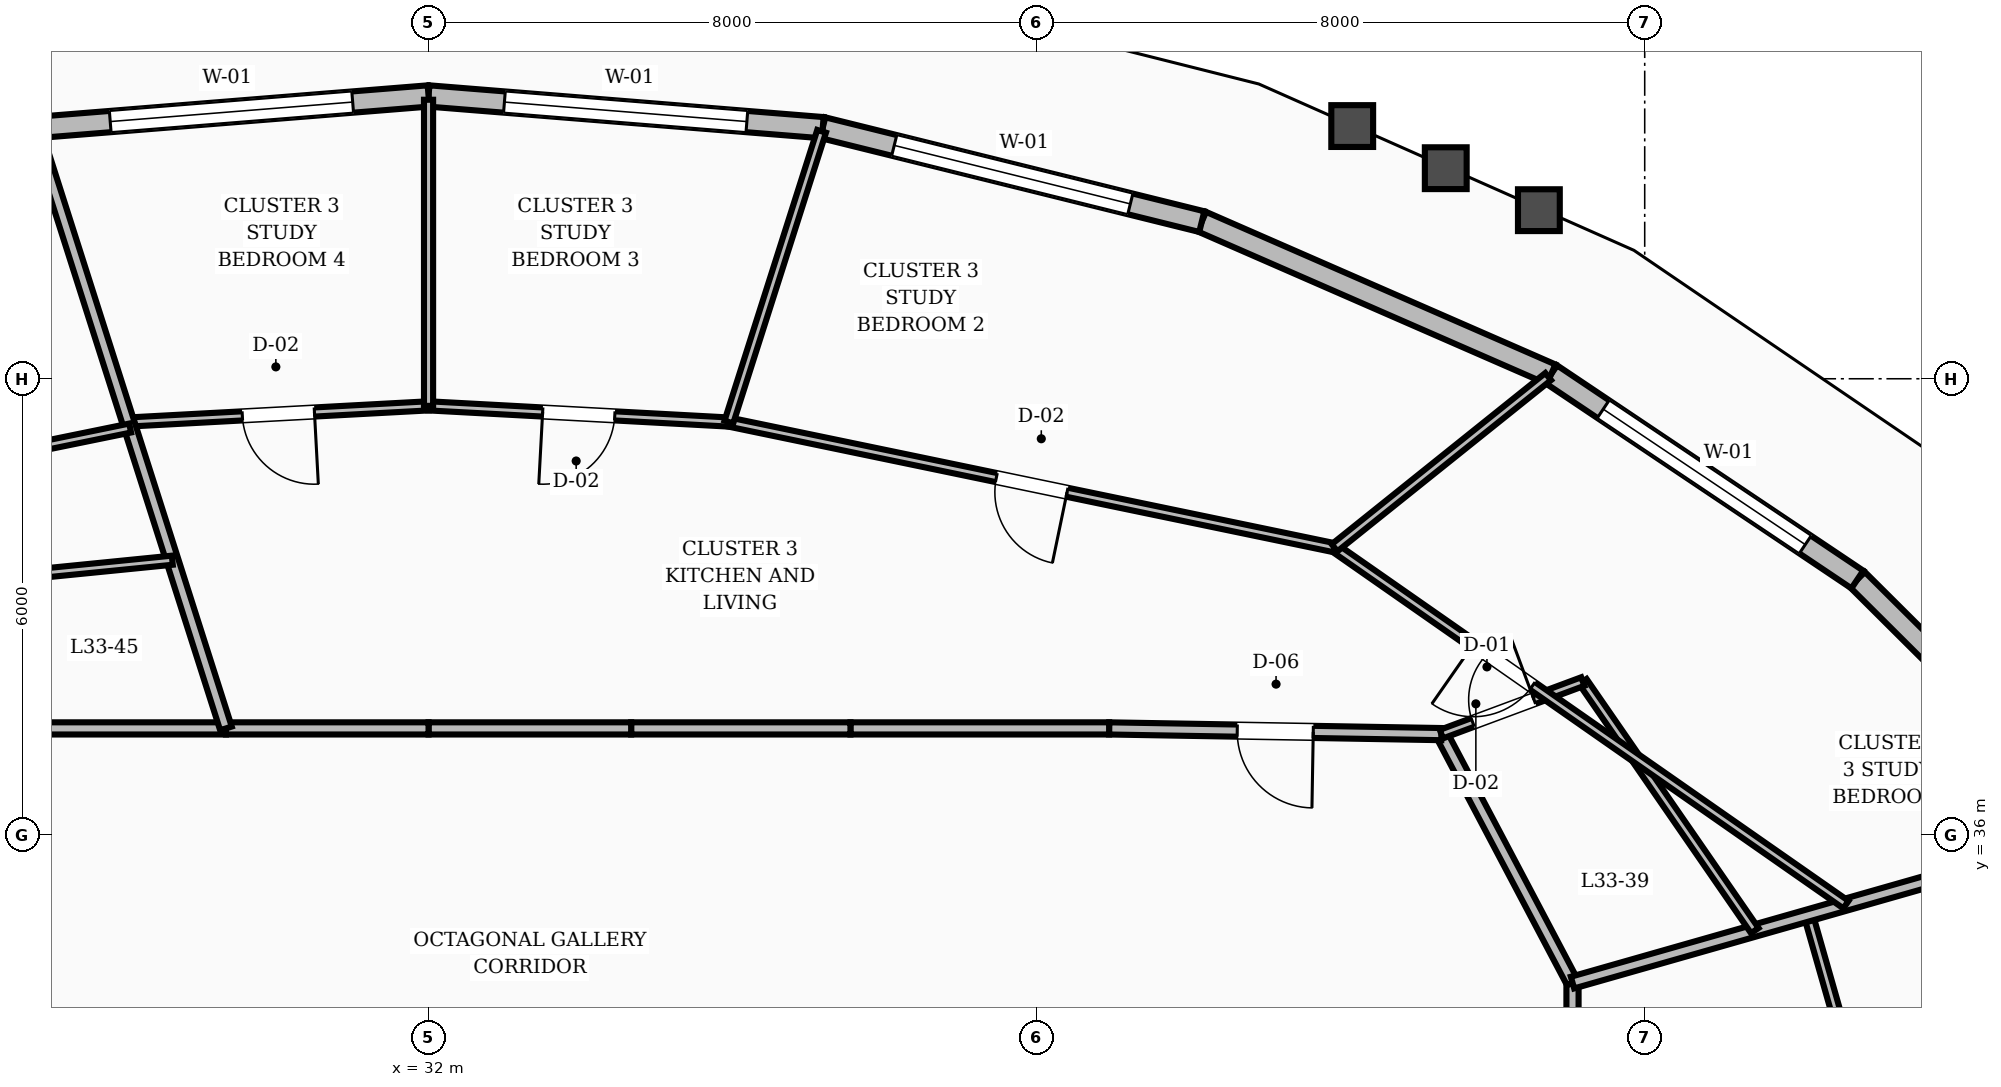
"""IFC4 building model, lengths in metres.
Left out: names, types, materials, properties, quantities, classifications, styles, units other than length and angle.
Written with IfcOpenShell. Run it as: python <this file> out.ifc"""

import sys

from ifc_helpers import new_model, si_unit, direction, frame, frame_2d, origin, place, context, subcontext, project, spatial, rectangle, extrude, element, fill, save


model = new_model("IFC4")
c1 = context("Model", 3, precision=1e-05, world=origin(), true_north=direction((0.0, 1.0)))
c2 = subcontext(c1, "Body", "Model", "MODEL_VIEW")
j1 = project(units=[si_unit("LENGTHUNIT", "METRE"), si_unit("PLANEANGLEUNIT", "RADIAN")], contexts=[c1])
p1 = place(None, origin())
s1 = spatial("IfcSite", under=j1, at=p1, CompositionType="ELEMENT")
p2 = place(p1, origin())
s2 = spatial("IfcBuilding", under=s1, at=p2, CompositionType="ELEMENT")
p3 = place(p2, frame((0.0, 0.0, 131.6)))
s3 = spatial("IfcBuildingStorey", under=s2, at=p3, CompositionType="ELEMENT", Elevation=131.6)
p4 = place(p3, frame((54.104, 36.067, 0.0), z_axis=(0.0, 0.0, 1.0), x_axis=(-0.708648936292, 0.705561255379, 0.0)))
e1 = element("IfcWall", 1, at=p4, inside=s3, PredefinedType="STANDARD", context=c2, shape_type="SweptSolid", body=[
    extrude(rectangle(XDim=4.665, YDim=0.28, at=frame_2d((2.333, 0.0))), origin(), (0.0, 0.0, 1.0), 2.82),
])
p5 = place(p3, frame((50.798, 39.359, 0.0), z_axis=(0.0, 0.0, 1.0), x_axis=(-0.830576039751, 0.556905236277, 0.0)))
e2 = element("IfcWall", 2, at=p5, inside=s3, PredefinedType="STANDARD", context=c2, shape_type="SweptSolid", body=[
    extrude(rectangle(XDim=4.85, YDim=0.28, at=frame_2d((2.425, 0.0))), origin(), (0.0, 0.0, 1.0), 2.82),
])
p6 = place(p5, frame((0.825, 0.0, 0.8)))
e3 = element("IfcOpeningElement", 3, at=p6, cuts=e2, PredefinedType="OPENING", context=c2, shape_type="SweptSolid", body=[
    extrude(rectangle(XDim=3.2, YDim=1.65, at=frame_2d((1.6, 0.825))), frame((0.0, 0.15, 0.0), z_axis=(0.0, -1.0, 0.0), x_axis=(1.0, 0.0, 0.0)), (0.0, 0.0, 1.0), 0.3),
])
p7 = place(p3, frame((46.769, 42.06, 0.0), z_axis=(0.0, 0.0, 1.0), x_axis=(-0.916424160111, 0.400208394171, 0.0)))
e4 = element("IfcWall", 4, at=p7, inside=s3, PredefinedType="STANDARD", context=c2, shape_type="SweptSolid", body=[
    extrude(rectangle(XDim=5.015, YDim=0.28, at=frame_2d((2.508, 0.0))), origin(), (0.0, 0.0, 1.0), 2.82),
])
p8 = place(p3, frame((42.173, 44.067, 0.0), z_axis=(0.0, 0.0, 1.0), x_axis=(-0.970626922291, 0.24058964592, 0.0)))
e5 = element("IfcWall", 5, at=p8, inside=s3, PredefinedType="STANDARD", context=c2, shape_type="SweptSolid", body=[
    extrude(rectangle(XDim=5.138, YDim=0.28, at=frame_2d((2.569, 0.0))), origin(), (0.0, 0.0, 1.0), 2.82),
])
p9 = place(p8, frame((0.969, 0.0, 0.8)))
e6 = element("IfcOpeningElement", 6, at=p9, cuts=e5, PredefinedType="OPENING", context=c2, shape_type="SweptSolid", body=[
    extrude(rectangle(XDim=3.2, YDim=1.65, at=frame_2d((1.6, 0.825))), frame((0.0, 0.15, 0.0), z_axis=(0.0, -1.0, 0.0), x_axis=(1.0, 0.0, 0.0)), (0.0, 0.0, 1.0), 0.3),
])
p10 = place(p3, frame((37.186, 45.303, 0.0), z_axis=(0.0, 0.0, 1.0), x_axis=(-0.996775768856, 0.080237563656, 0.0)))
e7 = element("IfcWall", 7, at=p10, inside=s3, PredefinedType="STANDARD", context=c2, shape_type="SweptSolid", body=[
    extrude(rectangle(XDim=5.203, YDim=0.28, at=frame_2d((2.602, 0.0))), origin(), (0.0, 0.0, 1.0), 2.82),
])
p11 = place(p10, frame((1.001, 0.0, 0.8)))
e8 = element("IfcOpeningElement", 8, at=p11, cuts=e7, PredefinedType="OPENING", context=c2, shape_type="SweptSolid", body=[
    extrude(rectangle(XDim=3.2, YDim=1.65, at=frame_2d((1.6, 0.825))), frame((0.0, 0.15, 0.0), z_axis=(0.0, -1.0, 0.0), x_axis=(1.0, 0.0, 0.0)), (0.0, 0.0, 1.0), 0.3),
])
p12 = place(p3, frame((32.0, 45.721, 0.0), z_axis=(0.0, 0.0, 1.0), x_axis=(-0.996775768856, -0.080237563656, 0.0)))
e9 = element("IfcWall", 9, at=p12, inside=s3, PredefinedType="STANDARD", context=c2, shape_type="SweptSolid", body=[
    extrude(rectangle(XDim=5.203, YDim=0.28, at=frame_2d((2.602, 0.0))), origin(), (0.0, 0.0, 1.0), 2.82),
])
p13 = place(p12, frame((1.001, 0.0, 0.8)))
e10 = element("IfcOpeningElement", 10, at=p13, cuts=e9, PredefinedType="OPENING", context=c2, shape_type="SweptSolid", body=[
    extrude(rectangle(XDim=3.2, YDim=1.65, at=frame_2d((1.6, 0.825))), frame((0.0, 0.15, 0.0), z_axis=(0.0, -1.0, 0.0), x_axis=(1.0, 0.0, 0.0)), (0.0, 0.0, 1.0), 0.3),
])
p14 = place(p3, frame((47.05, 30.234, 0.0), z_axis=(0.0, 0.0, 1.0), x_axis=(0.0, 1.0, 0.0)))
e11 = element("IfcWall", 11, at=p14, inside=s3, PredefinedType="SOLIDWALL", context=c2, shape_type="SweptSolid", body=[
    extrude(rectangle(XDim=3.822, YDim=0.16, at=frame_2d((1.911, 0.0))), origin(), (0.0, 0.0, 1.0), 2.8),
])
p15 = place(p3, frame((47.05, 34.056, 0.0), z_axis=(0.0, 0.0, 1.0), x_axis=(-0.466737093093, 0.884396113702, 0.0)))
e12 = element("IfcWall", 12, at=p15, inside=s3, PredefinedType="SOLIDWALL", context=c2, shape_type="SweptSolid", body=[
    extrude(rectangle(XDim=3.696, YDim=0.16, at=frame_2d((1.848, 0.0))), origin(), (0.0, 0.0, 1.0), 2.8),
])
p16 = place(p3, frame((45.325, 37.325, 0.0), z_axis=(0.0, 0.0, 1.0), x_axis=(-0.999853038912, 0.017143528788, 0.0)))
e13 = element("IfcWall", 13, at=p16, inside=s3, PredefinedType="SOLIDWALL", context=c2, shape_type="SweptSolid", body=[
    extrude(rectangle(XDim=4.372, YDim=0.16, at=frame_2d((2.186, 0.0))), origin(), (0.0, 0.0, 1.0), 2.8),
])
p17 = place(p16, frame((1.686, 0.0, 0.0)))
e14 = element("IfcOpeningElement", 14, at=p17, cuts=e13, PredefinedType="OPENING", context=c2, shape_type="SweptSolid", body=[
    extrude(rectangle(XDim=1.0, YDim=2.1, at=frame_2d((0.5, 1.05))), frame((0.0, 0.09, 0.0), z_axis=(0.0, -1.0, 0.0), x_axis=(1.0, 0.0, 0.0)), (0.0, 0.0, 1.0), 0.18),
])
p18 = place(p3, frame((40.954, 37.4, 0.0), z_axis=(0.0, 0.0, 1.0), x_axis=(-1.0, 0.0, 0.0)))
e15 = element("IfcWall", 15, at=p18, inside=s3, PredefinedType="SOLIDWALL", context=c2, shape_type="SweptSolid", body=[
    extrude(rectangle(XDim=3.403, YDim=0.16, at=frame_2d((1.702, 0.0))), origin(), (0.0, 0.0, 1.0), 2.8),
])
p19 = place(p3, frame((37.551, 37.4, 0.0), z_axis=(0.0, 0.0, 1.0), x_axis=(-1.0, 0.0, 0.0)))
e16 = element("IfcWall", 16, at=p19, inside=s3, PredefinedType="SOLIDWALL", context=c2, shape_type="SweptSolid", body=[
    extrude(rectangle(XDim=2.885, YDim=0.16, at=frame_2d((1.443, 0.0))), origin(), (0.0, 0.0, 1.0), 2.8),
])
for number, where, z_axis, x_axis in (
    (17, (34.665, 37.4, 0.0), (0.0, 0.0, 1.0), (-1.0, 0.0, 0.0)),
    (18, (32.0, 37.4, 0.0), (0.0, 0.0, 1.0), (-1.0, 0.0, 0.0)),
):
    element("IfcWall", number, at=place(p3, frame(where, z_axis=z_axis, x_axis=x_axis)), inside=s3, PredefinedType="SOLIDWALL", context=c2, shape_type="SweptSolid", body=[
        extrude(rectangle(XDim=2.665, YDim=0.16, at=frame_2d((1.333, 0.0))), origin(), (0.0, 0.0, 1.0), 2.8),
    ])
p20 = place(p3, frame((29.335, 37.4, 0.0), z_axis=(0.0, 0.0, 1.0), x_axis=(-1.0, 0.0, 0.0)))
e19 = element("IfcWall", 19, at=p20, inside=s3, PredefinedType="SOLIDWALL", context=c2, shape_type="SweptSolid", body=[
    extrude(rectangle(XDim=2.885, YDim=0.16, at=frame_2d((1.443, 0.0))), origin(), (0.0, 0.0, 1.0), 2.8),
])
p21 = place(p3, frame((51.234, 31.148, 0.0), z_axis=(0.0, 0.0, 1.0), x_axis=(-0.274058783109, 0.961712942307, 0.0)))
e20 = element("IfcWall", 20, at=p21, inside=s3, PredefinedType="PARTITIONING", context=c2, shape_type="SweptSolid", body=[
    extrude(rectangle(XDim=3.944, YDim=0.12, at=frame_2d((1.972, 0.0))), origin(), (0.0, 0.0, 1.0), 2.8),
])
p22 = place(p21, frame((1.497, 0.0, 0.0)))
e21 = element("IfcOpeningElement", 21, at=p22, cuts=e20, PredefinedType="OPENING", context=c2, shape_type="SweptSolid", body=[
    extrude(rectangle(XDim=0.95, YDim=2.1, at=frame_2d((0.475, 1.05))), frame((0.0, 0.07, 0.0), z_axis=(0.0, -1.0, 0.0), x_axis=(1.0, 0.0, 0.0)), (0.0, 0.0, 1.0), 0.14),
])
p23 = place(p3, frame((47.05, 34.056, 0.0), z_axis=(0.0, 0.0, 1.0), x_axis=(0.961667991251, 0.274216473981, 0.0)))
e22 = element("IfcWall", 22, at=p23, inside=s3, PredefinedType="SOLIDWALL", context=c2, shape_type="SweptSolid", body=[
    extrude(rectangle(XDim=7.285, YDim=0.16, at=frame_2d((3.642, 0.0))), origin(), (0.0, 0.0, 1.0), 2.8),
])
p24 = place(p3, frame((49.448, 34.74, 0.0), z_axis=(0.0, 0.0, 1.0), x_axis=(-0.568195659841, 0.822893487723, 0.0)))
e23 = element("IfcWall", 23, at=p24, inside=s3, PredefinedType="PARTITIONING", context=c2, shape_type="SweptSolid", body=[
    extrude(rectangle(XDim=3.982, YDim=0.12, at=frame_2d((1.991, 0.0))), origin(), (0.0, 0.0, 1.0), 2.8),
])
p25 = place(p3, frame((45.325, 37.325, 0.0), z_axis=(0.0, 0.0, 1.0), x_axis=(0.937346114238, 0.348399572506, 0.0)))
e24 = element("IfcWall", 24, at=p25, inside=s3, PredefinedType="PARTITIONING", context=c2, shape_type="SweptSolid", body=[
    extrude(rectangle(XDim=1.985, YDim=0.12, at=frame_2d((0.993, 0.0))), origin(), (0.0, 0.0, 1.0), 2.8),
])
p26 = place(p25, frame((0.44, 0.0, 0.0)))
e25 = element("IfcOpeningElement", 25, at=p26, cuts=e24, PredefinedType="OPENING", context=c2, shape_type="SweptSolid", body=[
    extrude(rectangle(XDim=0.86, YDim=2.1, at=frame_2d((0.43, 1.05))), frame((0.0, 0.07, 0.0), z_axis=(0.0, -1.0, 0.0), x_axis=(1.0, 0.0, 0.0)), (0.0, 0.0, 1.0), 0.14),
])
p27 = place(p3, frame((50.647, 35.082, 0.0), z_axis=(0.0, 0.0, 1.0), x_axis=(-0.820068492929, 0.572265381537, 0.0)))
e26 = element("IfcWall", 26, at=p27, inside=s3, PredefinedType="PARTITIONING", context=c2, shape_type="SweptSolid", body=[
    extrude(rectangle(XDim=8.204, YDim=0.12, at=frame_2d((4.102, 0.0))), origin(), (0.0, 0.0, 1.0), 2.8),
])
p28 = place(p27, frame((5.029, 0.0, 0.0)))
e27 = element("IfcOpeningElement", 27, at=p28, cuts=e26, PredefinedType="OPENING", context=c2, shape_type="SweptSolid", body=[
    extrude(rectangle(XDim=0.95, YDim=2.1, at=frame_2d((0.475, 1.05))), frame((0.0, 0.07, 0.0), z_axis=(0.0, -1.0, 0.0), x_axis=(1.0, 0.0, 0.0)), (0.0, 0.0, 1.0), 0.14),
])
p29 = place(p3, frame((43.919, 39.777, 0.0), z_axis=(0.0, 0.0, 1.0), x_axis=(-0.97912865648, 0.20324141817, 0.0)))
e28 = element("IfcWall", 28, at=p29, inside=s3, PredefinedType="PARTITIONING", context=c2, shape_type="SweptSolid", body=[
    extrude(rectangle(XDim=8.138, YDim=0.12, at=frame_2d((4.069, 0.0))), origin(), (0.0, 0.0, 1.0), 2.8),
])
p30 = place(p29, frame((3.594, 0.0, 0.0)))
e29 = element("IfcOpeningElement", 29, at=p30, cuts=e28, PredefinedType="OPENING", context=c2, shape_type="SweptSolid", body=[
    extrude(rectangle(XDim=0.95, YDim=2.1, at=frame_2d((0.475, 1.05))), frame((0.0, 0.07, 0.0), z_axis=(0.0, -1.0, 0.0), x_axis=(1.0, 0.0, 0.0)), (0.0, 0.0, 1.0), 0.14),
])
p31 = place(p3, frame((43.919, 39.777, 0.0), z_axis=(0.0, 0.0, 1.0), x_axis=(0.780359323849, 0.625331372699, 0.0)))
e30 = element("IfcWall", 30, at=p31, inside=s3, PredefinedType="PARTITIONING", context=c2, shape_type="SweptSolid", body=[
    extrude(rectangle(XDim=3.602, YDim=0.12, at=frame_2d((1.801, 0.0))), origin(), (0.0, 0.0, 1.0), 2.8),
])
p32 = place(p3, frame((35.951, 41.431, 0.0), z_axis=(0.0, 0.0, 1.0), x_axis=(-0.998551426798, 0.053805650631, 0.0)))
e31 = element("IfcWall", 31, at=p32, inside=s3, PredefinedType="PARTITIONING", context=c2, shape_type="SweptSolid", body=[
    extrude(rectangle(XDim=3.957, YDim=0.12, at=frame_2d((1.978, 0.0))), origin(), (0.0, 0.0, 1.0), 2.8),
])
p33 = place(p32, frame((1.503, 0.0, 0.0)))
e32 = element("IfcOpeningElement", 32, at=p33, cuts=e31, PredefinedType="OPENING", context=c2, shape_type="SweptSolid", body=[
    extrude(rectangle(XDim=0.95, YDim=2.1, at=frame_2d((0.475, 1.05))), frame((0.0, 0.07, 0.0), z_axis=(0.0, -1.0, 0.0), x_axis=(1.0, 0.0, 0.0)), (0.0, 0.0, 1.0), 0.14),
])
p34 = place(p3, frame((35.951, 41.431, 0.0), z_axis=(0.0, 0.0, 1.0), x_axis=(0.303868730984, 0.952713910012, 0.0)))
e33 = element("IfcWall", 33, at=p34, inside=s3, PredefinedType="PARTITIONING", context=c2, shape_type="SweptSolid", body=[
    extrude(rectangle(XDim=4.015, YDim=0.12, at=frame_2d((2.007, 0.0))), origin(), (0.0, 0.0, 1.0), 2.8),
])
p35 = place(p3, frame((32.0, 41.644, 0.0), z_axis=(0.0, 0.0, 1.0), x_axis=(-0.998551426798, -0.053805650631, 0.0)))
e34 = element("IfcWall", 34, at=p35, inside=s3, PredefinedType="PARTITIONING", context=c2, shape_type="SweptSolid", body=[
    extrude(rectangle(XDim=3.957, YDim=0.12, at=frame_2d((1.978, 0.0))), origin(), (0.0, 0.0, 1.0), 2.8),
])
p36 = place(p35, frame((1.503, 0.0, 0.0)))
e35 = element("IfcOpeningElement", 35, at=p36, cuts=e34, PredefinedType="OPENING", context=c2, shape_type="SweptSolid", body=[
    extrude(rectangle(XDim=0.95, YDim=2.1, at=frame_2d((0.475, 1.05))), frame((0.0, 0.07, 0.0), z_axis=(0.0, -1.0, 0.0), x_axis=(1.0, 0.0, 0.0)), (0.0, 0.0, 1.0), 0.14),
])
p37 = place(p3, frame((32.0, 41.644, 0.0), z_axis=(0.0, 0.0, 1.0), x_axis=(0.0, 1.0, 0.0)))
e36 = element("IfcWall", 36, at=p37, inside=s3, PredefinedType="PARTITIONING", context=c2, shape_type="SweptSolid", body=[
    extrude(rectangle(XDim=4.027, YDim=0.12, at=frame_2d((2.014, 0.0))), origin(), (0.0, 0.0, 1.0), 2.8),
])
p38 = place(p3, frame((29.335, 37.4, 0.0), z_axis=(0.0, 0.0, 1.0), x_axis=(-0.303872079368, 0.952712842036, 0.0)))
e37 = element("IfcWall", 37, at=p38, inside=s3, PredefinedType="SOLIDWALL", context=c2, shape_type="SweptSolid", body=[
    extrude(rectangle(XDim=8.246, YDim=0.16, at=frame_2d((4.123, 0.0))), origin(), (0.0, 0.0, 1.0), 2.8),
])
p39 = place(p3, frame((28.629, 39.613, 0.0), z_axis=(0.0, 0.0, 1.0), x_axis=(-0.995077271549, -0.099102086996, 0.0)))
e38 = element("IfcWall", 38, at=p39, inside=s3, PredefinedType="PARTITIONING", context=c2, shape_type="SweptSolid", body=[
    extrude(rectangle(XDim=3.491, YDim=0.12, at=frame_2d((1.745, 0.0))), origin(), (0.0, 0.0, 1.0), 2.8),
])
p40 = place(p3, frame((28.074, 41.352, 0.0), z_axis=(0.0, 0.0, 1.0), x_axis=(-0.979753649481, -0.200206858844, 0.0)))
e39 = element("IfcWall", 39, at=p40, inside=s3, PredefinedType="PARTITIONING", context=c2, shape_type="SweptSolid", body=[
    extrude(rectangle(XDim=8.1, YDim=0.12, at=frame_2d((4.05, 0.0))), origin(), (0.0, 0.0, 1.0), 2.8),
])
p41 = place(p40, frame((4.954, 0.0, 0.0)))
e40 = element("IfcOpeningElement", 40, at=p41, cuts=e39, PredefinedType="OPENING", context=c2, shape_type="SweptSolid", body=[
    extrude(rectangle(XDim=0.95, YDim=2.1, at=frame_2d((0.475, 1.05))), frame((0.0, 0.07, 0.0), z_axis=(0.0, -1.0, 0.0), x_axis=(1.0, 0.0, 0.0)), (0.0, 0.0, 1.0), 0.14),
])
p42 = place(p6, origin())
e41 = element("IfcWindow", 41, at=p42, inside=s3, PartitioningType="SINGLE_PANEL", PredefinedType="WINDOW", context=c2, shape_type="SweptSolid", body=[
    extrude(rectangle(XDim=3.2, YDim=1.65, at=frame_2d((1.6, 0.825))), frame((0.0, 0.03, 0.0), z_axis=(0.0, -1.0, 0.0), x_axis=(1.0, 0.0, 0.0)), (0.0, 0.0, 1.0), 0.06),
])
fill(e3, e41)
p43 = place(p9, origin())
e42 = element("IfcWindow", 42, at=p43, inside=s3, PartitioningType="SINGLE_PANEL", PredefinedType="WINDOW", context=c2, shape_type="SweptSolid", body=[
    extrude(rectangle(XDim=3.2, YDim=1.65, at=frame_2d((1.6, 0.825))), frame((0.0, 0.03, 0.0), z_axis=(0.0, -1.0, 0.0), x_axis=(1.0, 0.0, 0.0)), (0.0, 0.0, 1.0), 0.06),
])
fill(e6, e42)
p44 = place(p11, origin())
e43 = element("IfcWindow", 43, at=p44, inside=s3, PartitioningType="SINGLE_PANEL", PredefinedType="WINDOW", context=c2, shape_type="SweptSolid", body=[
    extrude(rectangle(XDim=3.2, YDim=1.65, at=frame_2d((1.6, 0.825))), frame((0.0, 0.03, 0.0), z_axis=(0.0, -1.0, 0.0), x_axis=(1.0, 0.0, 0.0)), (0.0, 0.0, 1.0), 0.06),
])
fill(e8, e43)
p45 = place(p13, origin())
e44 = element("IfcWindow", 44, at=p45, inside=s3, PartitioningType="SINGLE_PANEL", PredefinedType="WINDOW", context=c2, shape_type="SweptSolid", body=[
    extrude(rectangle(XDim=3.2, YDim=1.65, at=frame_2d((1.6, 0.825))), frame((0.0, 0.03, 0.0), z_axis=(0.0, -1.0, 0.0), x_axis=(1.0, 0.0, 0.0)), (0.0, 0.0, 1.0), 0.06),
])
fill(e10, e44)
p46 = place(p26, origin())
e45 = element("IfcDoor", 45, at=p46, inside=s3, OperationType="SINGLE_SWING_RIGHT", PredefinedType="DOOR", context=c2, shape_type="SweptSolid", body=[
    extrude(rectangle(XDim=0.86, YDim=2.1, at=frame_2d((0.43, 1.05))), frame((0.0, 0.025, 0.0), z_axis=(0.0, -1.0, 0.0), x_axis=(1.0, 0.0, 0.0)), (0.0, 0.0, 1.0), 0.05),
])
fill(e25, e45)
p47 = place(p17, origin())
e46 = element("IfcDoor", 46, at=p47, inside=s3, OperationType="SINGLE_SWING_LEFT", PredefinedType="DOOR", context=c2, shape_type="SweptSolid", body=[
    extrude(rectangle(XDim=1.0, YDim=2.1, at=frame_2d((0.5, 1.05))), frame((0.0, 0.025, 0.0), z_axis=(0.0, -1.0, 0.0), x_axis=(1.0, 0.0, 0.0)), (0.0, 0.0, 1.0), 0.05),
])
fill(e14, e46)
p48 = place(p28, origin())
e47 = element("IfcDoor", 47, at=p48, inside=s3, OperationType="SINGLE_SWING_RIGHT", PredefinedType="DOOR", context=c2, shape_type="SweptSolid", body=[
    extrude(rectangle(XDim=0.95, YDim=2.1, at=frame_2d((0.475, 1.05))), frame((0.0, 0.025, 0.0), z_axis=(0.0, -1.0, 0.0), x_axis=(1.0, 0.0, 0.0)), (0.0, 0.0, 1.0), 0.05),
])
fill(e27, e47)
p49 = place(p30, origin())
e48 = element("IfcDoor", 48, at=p49, inside=s3, OperationType="SINGLE_SWING_LEFT", PredefinedType="DOOR", context=c2, shape_type="SweptSolid", body=[
    extrude(rectangle(XDim=0.95, YDim=2.1, at=frame_2d((0.475, 1.05))), frame((0.0, 0.025, 0.0), z_axis=(0.0, -1.0, 0.0), x_axis=(1.0, 0.0, 0.0)), (0.0, 0.0, 1.0), 0.05),
])
fill(e29, e48)
p50 = place(p33, origin())
e49 = element("IfcDoor", 49, at=p50, inside=s3, OperationType="SINGLE_SWING_RIGHT", PredefinedType="DOOR", context=c2, shape_type="SweptSolid", body=[
    extrude(rectangle(XDim=0.95, YDim=2.1, at=frame_2d((0.475, 1.05))), frame((0.0, 0.025, 0.0), z_axis=(0.0, -1.0, 0.0), x_axis=(1.0, 0.0, 0.0)), (0.0, 0.0, 1.0), 0.05),
])
fill(e32, e49)
p51 = place(p36, origin())
e50 = element("IfcDoor", 50, at=p51, inside=s3, OperationType="SINGLE_SWING_LEFT", PredefinedType="DOOR", context=c2, shape_type="SweptSolid", body=[
    extrude(rectangle(XDim=0.95, YDim=2.1, at=frame_2d((0.475, 1.05))), frame((0.0, 0.025, 0.0), z_axis=(0.0, -1.0, 0.0), x_axis=(1.0, 0.0, 0.0)), (0.0, 0.0, 1.0), 0.05),
])
fill(e35, e50)
save(model, sys.argv[1])
